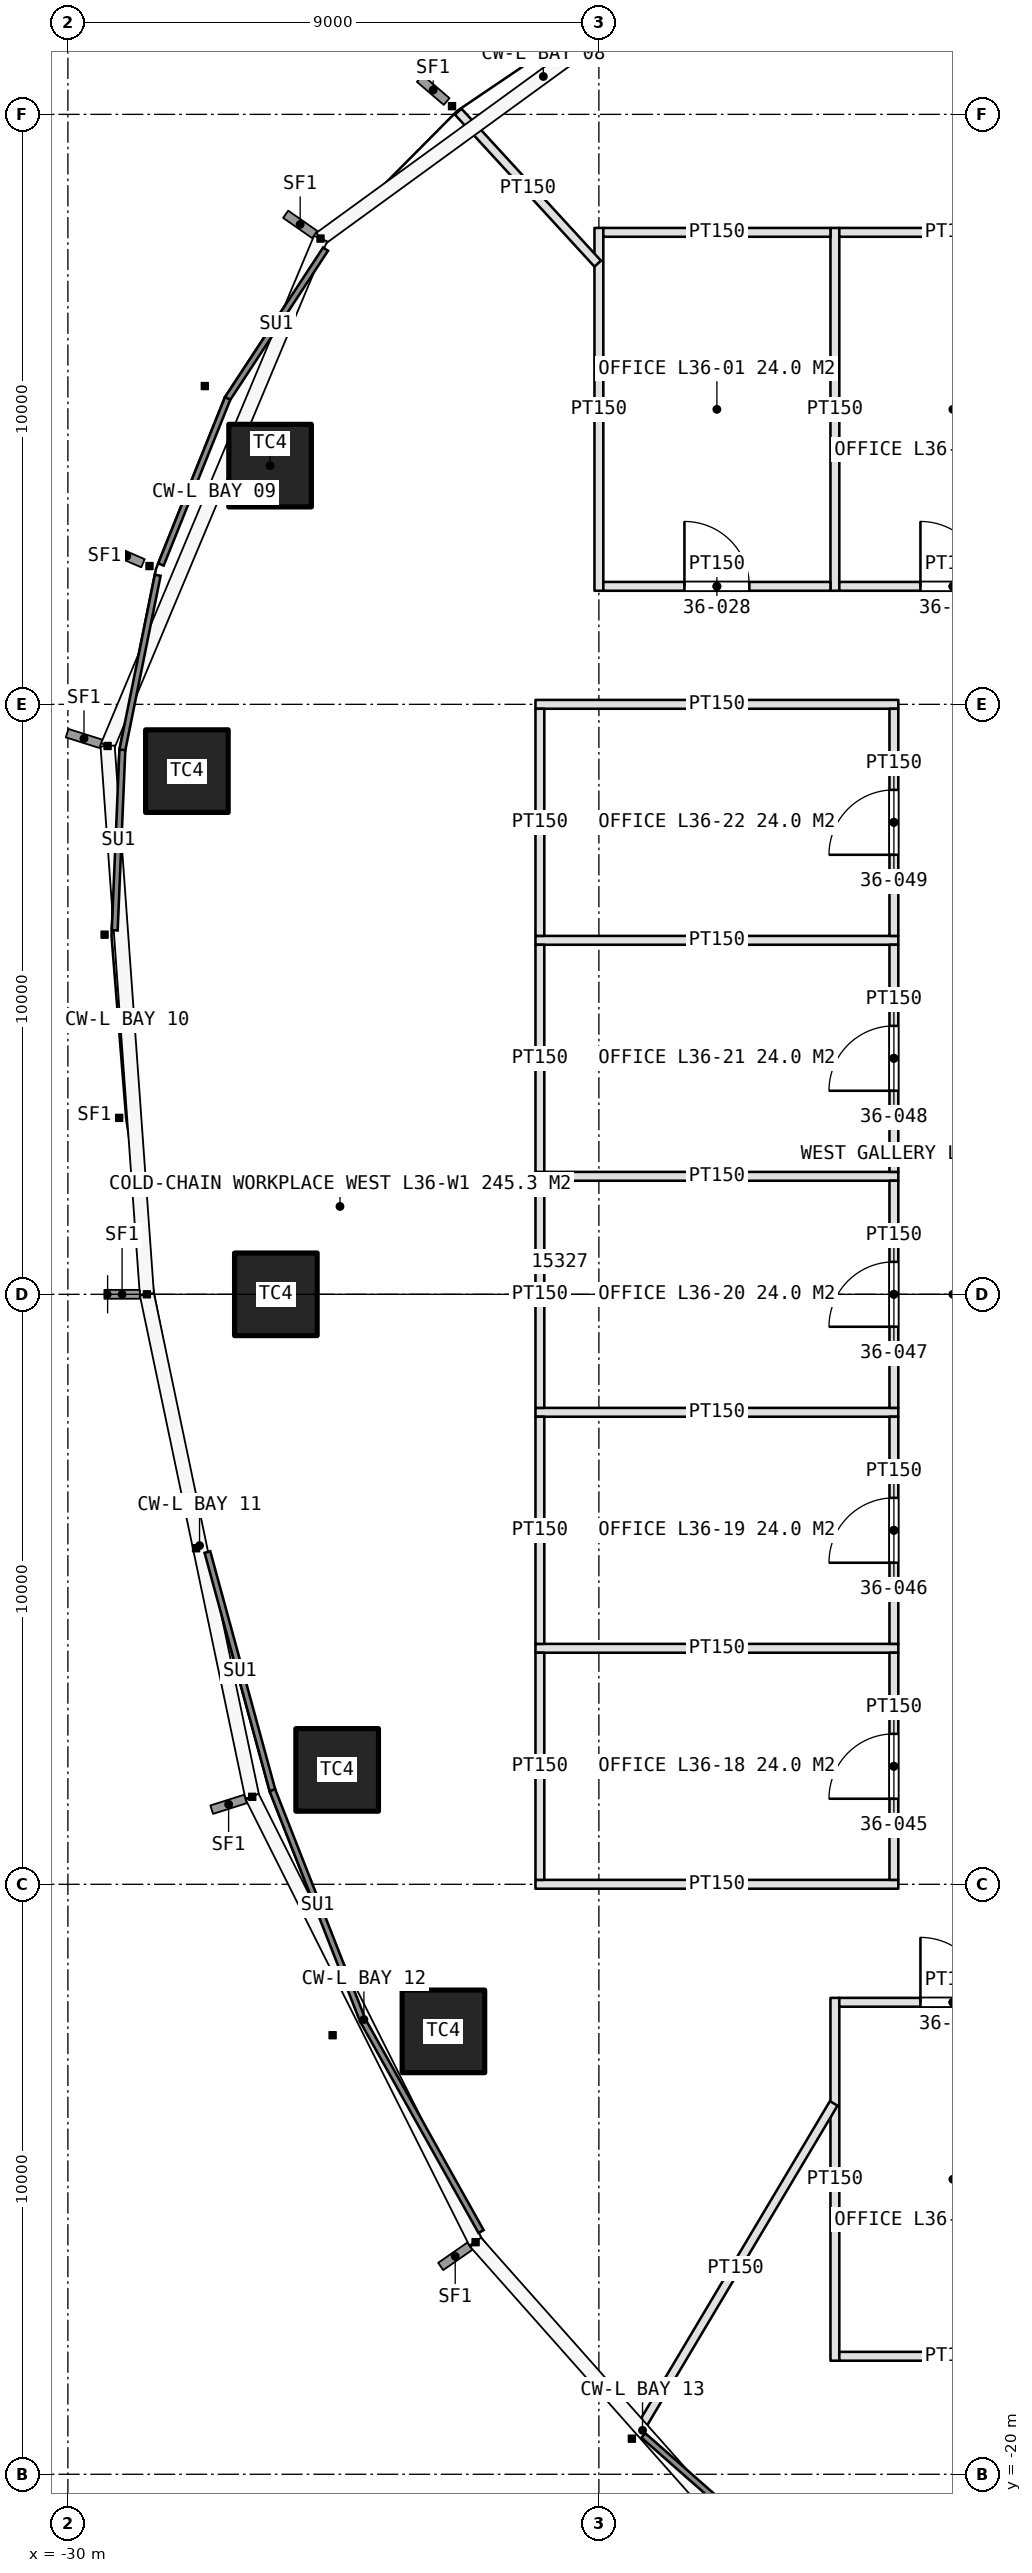
"""IFC4 building model, lengths in metres.
Left out: names, types, materials, properties, quantities, classifications, styles, units other than length and angle.
Written with IfcOpenShell. Run it as: python <this file> out.ifc"""

import sys

from ifc_helpers import new_model, si_unit, direction, frame, frame_2d, origin, origin_2d, place, context, subcontext, project, spatial, rectangle, extrude, element, fill, save


model = new_model("IFC4")
c1 = context("Model", 3, precision=1e-05, world=origin(), true_north=direction((0.0, 1.0)))
c2 = subcontext(c1, "Body", "Model", "MODEL_VIEW")
j1 = project(units=[si_unit("LENGTHUNIT", "METRE"), si_unit("PLANEANGLEUNIT", "RADIAN")], contexts=[c1])
p1 = place(None, origin())
s1 = spatial("IfcSite", under=j1, at=p1, CompositionType="ELEMENT")
p2 = place(p1, origin())
s2 = spatial("IfcBuilding", under=s1, at=p2, CompositionType="ELEMENT")
p3 = place(p2, frame((0.0, 0.0, 168.0)))
s3 = spatial("IfcBuildingStorey", under=s2, at=p3, CompositionType="ELEMENT", Elevation=168.0)
for number, where, z_axis, x_axis in (
    (1, (-26.573, 14.046, 0.0), (0.0, 0.0, 1.0), (1.0, 0.0, 0.0)),
    (2, (-27.983, 8.868, 0.0), (0.0, 0.0, 1.0), (1.0, 0.0, 0.0)),
    (3, (-26.475, 0.0, 0.0), (0.0, 0.0, 1.0), (1.0, 0.0, 0.0)),
    (4, (-25.436, -8.061, 0.0), (0.0, 0.0, 1.0), (1.0, 0.0, 0.0)),
    (5, (-23.635, -12.493, 0.0), (0.0, 0.0, 1.0), (1.0, 0.0, 0.0)),
):
    element("IfcColumn", number, at=place(p3, frame(where, z_axis=z_axis, x_axis=x_axis)), inside=s3, PredefinedType="COLUMN", context=c2, shape_type="SweptSolid", body=[
        extrude(rectangle(XDim=1.4, YDim=1.4, at=origin_2d()), origin(), (0.0, 0.0, 1.0), 4.2),
    ])
for number, where, z_axis, x_axis in (
    (6, (-21.0, 11.925, 0.0), (0.0, 0.0, 1.0), (0.0, 1.0, 0.0)),
    (7, (-17.0, 11.925, 0.0), (0.0, 0.0, 1.0), (0.0, 1.0, 0.0)),
):
    element("IfcWall", number, at=place(p3, frame(where, z_axis=z_axis, x_axis=x_axis)), inside=s3, PredefinedType="PARTITIONING", context=c2, shape_type="SweptSolid", body=[
        extrude(rectangle(XDim=6.15, YDim=0.15, at=frame_2d((3.075, 0.0))), origin(), (0.0, 0.0, 1.0), 3.0),
    ])
p4 = place(p3, frame((-20.925, 12.0, 0.0), z_axis=(0.0, 0.0, 1.0), x_axis=(1.0, 0.0, 0.0)))
e8 = element("IfcWall", 8, at=p4, inside=s3, PredefinedType="PARTITIONING", context=c2, shape_type="SweptSolid", body=[
    extrude(rectangle(XDim=3.85, YDim=0.15, at=frame_2d((1.925, 0.0))), origin(), (0.0, 0.0, 1.0), 3.0),
])
p5 = place(p4, frame((1.375, 0.0, 0.0)))
e9 = element("IfcOpeningElement", 9, at=p5, cuts=e8, PredefinedType="OPENING", context=c2, shape_type="SweptSolid", body=[
    extrude(rectangle(XDim=1.1, YDim=2.3, at=frame_2d((0.55, 1.15))), frame((0.0, 0.085, 0.0), z_axis=(0.0, -1.0, 0.0), x_axis=(1.0, 0.0, 0.0)), (0.0, 0.0, 1.0), 0.17),
])
p6 = place(p3, frame((-20.925, 18.0, 0.0), z_axis=(0.0, 0.0, 1.0), x_axis=(1.0, 0.0, 0.0)))
e10 = element("IfcWall", 10, at=p6, inside=s3, PredefinedType="PARTITIONING", context=c2, shape_type="SweptSolid", body=[
    extrude(rectangle(XDim=3.85, YDim=0.15, at=frame_2d((1.925, 0.0))), origin(), (0.0, 0.0, 1.0), 3.0),
])
p7 = place(p3, frame((-16.925, 12.0, 0.0), z_axis=(0.0, 0.0, 1.0), x_axis=(1.0, 0.0, 0.0)))
e11 = element("IfcWall", 11, at=p7, inside=s3, PredefinedType="PARTITIONING", context=c2, shape_type="SweptSolid", body=[
    extrude(rectangle(XDim=3.85, YDim=0.15, at=frame_2d((1.925, 0.0))), origin(), (0.0, 0.0, 1.0), 3.0),
])
p8 = place(p7, frame((1.375, 0.0, 0.0)))
e12 = element("IfcOpeningElement", 12, at=p8, cuts=e11, PredefinedType="OPENING", context=c2, shape_type="SweptSolid", body=[
    extrude(rectangle(XDim=1.1, YDim=2.3, at=frame_2d((0.55, 1.15))), frame((0.0, 0.085, 0.0), z_axis=(0.0, -1.0, 0.0), x_axis=(1.0, 0.0, 0.0)), (0.0, 0.0, 1.0), 0.17),
])
p9 = place(p3, frame((-16.925, 18.0, 0.0), z_axis=(0.0, 0.0, 1.0), x_axis=(1.0, 0.0, 0.0)))
e13 = element("IfcWall", 13, at=p9, inside=s3, PredefinedType="PARTITIONING", context=c2, shape_type="SweptSolid", body=[
    extrude(rectangle(XDim=3.85, YDim=0.15, at=frame_2d((1.925, 0.0))), origin(), (0.0, 0.0, 1.0), 3.0),
])
p10 = place(p3, frame((-17.0, -11.925, 0.0), z_axis=(0.0, 0.0, 1.0), x_axis=(0.0, -1.0, 0.0)))
e14 = element("IfcWall", 14, at=p10, inside=s3, PredefinedType="PARTITIONING", context=c2, shape_type="SweptSolid", body=[
    extrude(rectangle(XDim=6.15, YDim=0.15, at=frame_2d((3.075, 0.0))), origin(), (0.0, 0.0, 1.0), 3.0),
])
p11 = place(p3, frame((-16.925, -12.0, 0.0), z_axis=(0.0, 0.0, 1.0), x_axis=(1.0, 0.0, 0.0)))
e15 = element("IfcWall", 15, at=p11, inside=s3, PredefinedType="PARTITIONING", context=c2, shape_type="SweptSolid", body=[
    extrude(rectangle(XDim=3.85, YDim=0.15, at=frame_2d((1.925, 0.0))), origin(), (0.0, 0.0, 1.0), 3.0),
])
p12 = place(p11, frame((1.375, 0.0, 0.0)))
e16 = element("IfcOpeningElement", 16, at=p12, cuts=e15, PredefinedType="OPENING", context=c2, shape_type="SweptSolid", body=[
    extrude(rectangle(XDim=1.1, YDim=2.3, at=frame_2d((0.55, 1.15))), frame((0.0, 0.085, 0.0), z_axis=(0.0, -1.0, 0.0), x_axis=(1.0, 0.0, 0.0)), (0.0, 0.0, 1.0), 0.17),
])
p13 = place(p3, frame((-16.925, -18.0, 0.0), z_axis=(0.0, 0.0, 1.0), x_axis=(1.0, 0.0, 0.0)))
e17 = element("IfcWall", 17, at=p13, inside=s3, PredefinedType="PARTITIONING", context=c2, shape_type="SweptSolid", body=[
    extrude(rectangle(XDim=3.85, YDim=0.15, at=frame_2d((1.925, 0.0))), origin(), (0.0, 0.0, 1.0), 3.0),
])
for number, where, z_axis, x_axis in (
    (18, (-15.925, -10.0, 0.0), (0.0, 0.0, 1.0), (-1.0, 0.0, 0.0)),
    (19, (-15.925, -6.0, 0.0), (0.0, 0.0, 1.0), (-1.0, 0.0, 0.0)),
    (20, (-15.925, -2.0, 0.0), (0.0, 0.0, 1.0), (-1.0, 0.0, 0.0)),
    (21, (-15.925, 2.0, 0.0), (0.0, 0.0, 1.0), (-1.0, 0.0, 0.0)),
    (22, (-15.925, 6.0, 0.0), (0.0, 0.0, 1.0), (-1.0, 0.0, 0.0)),
    (23, (-15.925, 10.0, 0.0), (0.0, 0.0, 1.0), (-1.0, 0.0, 0.0)),
):
    element("IfcWall", number, at=place(p3, frame(where, z_axis=z_axis, x_axis=x_axis)), inside=s3, PredefinedType="PARTITIONING", context=c2, shape_type="SweptSolid", body=[
        extrude(rectangle(XDim=6.15, YDim=0.15, at=frame_2d((3.075, 0.0))), origin(), (0.0, 0.0, 1.0), 3.0),
    ])
p14 = place(p3, frame((-16.0, -9.925, 0.0), z_axis=(0.0, 0.0, 1.0), x_axis=(0.0, 1.0, 0.0)))
e24 = element("IfcWall", 24, at=p14, inside=s3, PredefinedType="PARTITIONING", context=c2, shape_type="SweptSolid", body=[
    extrude(rectangle(XDim=3.85, YDim=0.15, at=frame_2d((1.925, 0.0))), origin(), (0.0, 0.0, 1.0), 3.0),
])
p15 = place(p14, frame((1.375, 0.0, 0.0)))
e25 = element("IfcOpeningElement", 25, at=p15, cuts=e24, PredefinedType="OPENING", context=c2, shape_type="SweptSolid", body=[
    extrude(rectangle(XDim=1.1, YDim=2.3, at=frame_2d((0.55, 1.15))), frame((0.0, 0.085, 0.0), z_axis=(0.0, -1.0, 0.0), x_axis=(1.0, 0.0, 0.0)), (0.0, 0.0, 1.0), 0.17),
])
p16 = place(p3, frame((-22.0, -9.925, 0.0), z_axis=(0.0, 0.0, 1.0), x_axis=(0.0, 1.0, 0.0)))
e26 = element("IfcWall", 26, at=p16, inside=s3, PredefinedType="PARTITIONING", context=c2, shape_type="SweptSolid", body=[
    extrude(rectangle(XDim=3.85, YDim=0.15, at=frame_2d((1.925, 0.0))), origin(), (0.0, 0.0, 1.0), 3.0),
])
p17 = place(p3, frame((-16.0, -5.925, 0.0), z_axis=(0.0, 0.0, 1.0), x_axis=(0.0, 1.0, 0.0)))
e27 = element("IfcWall", 27, at=p17, inside=s3, PredefinedType="PARTITIONING", context=c2, shape_type="SweptSolid", body=[
    extrude(rectangle(XDim=3.85, YDim=0.15, at=frame_2d((1.925, 0.0))), origin(), (0.0, 0.0, 1.0), 3.0),
])
p18 = place(p17, frame((1.375, 0.0, 0.0)))
e28 = element("IfcOpeningElement", 28, at=p18, cuts=e27, PredefinedType="OPENING", context=c2, shape_type="SweptSolid", body=[
    extrude(rectangle(XDim=1.1, YDim=2.3, at=frame_2d((0.55, 1.15))), frame((0.0, 0.085, 0.0), z_axis=(0.0, -1.0, 0.0), x_axis=(1.0, 0.0, 0.0)), (0.0, 0.0, 1.0), 0.17),
])
p19 = place(p3, frame((-22.0, -5.925, 0.0), z_axis=(0.0, 0.0, 1.0), x_axis=(0.0, 1.0, 0.0)))
e29 = element("IfcWall", 29, at=p19, inside=s3, PredefinedType="PARTITIONING", context=c2, shape_type="SweptSolid", body=[
    extrude(rectangle(XDim=3.85, YDim=0.15, at=frame_2d((1.925, 0.0))), origin(), (0.0, 0.0, 1.0), 3.0),
])
p20 = place(p3, frame((-16.0, -1.925, 0.0), z_axis=(0.0, 0.0, 1.0), x_axis=(0.0, 1.0, 0.0)))
e30 = element("IfcWall", 30, at=p20, inside=s3, PredefinedType="PARTITIONING", context=c2, shape_type="SweptSolid", body=[
    extrude(rectangle(XDim=3.85, YDim=0.15, at=frame_2d((1.925, 0.0))), origin(), (0.0, 0.0, 1.0), 3.0),
])
p21 = place(p20, frame((1.375, 0.0, 0.0)))
e31 = element("IfcOpeningElement", 31, at=p21, cuts=e30, PredefinedType="OPENING", context=c2, shape_type="SweptSolid", body=[
    extrude(rectangle(XDim=1.1, YDim=2.3, at=frame_2d((0.55, 1.15))), frame((0.0, 0.085, 0.0), z_axis=(0.0, -1.0, 0.0), x_axis=(1.0, 0.0, 0.0)), (0.0, 0.0, 1.0), 0.17),
])
p22 = place(p3, frame((-22.0, -1.925, 0.0), z_axis=(0.0, 0.0, 1.0), x_axis=(0.0, 1.0, 0.0)))
e32 = element("IfcWall", 32, at=p22, inside=s3, PredefinedType="PARTITIONING", context=c2, shape_type="SweptSolid", body=[
    extrude(rectangle(XDim=3.85, YDim=0.15, at=frame_2d((1.925, 0.0))), origin(), (0.0, 0.0, 1.0), 3.0),
])
p23 = place(p3, frame((-16.0, 2.075, 0.0), z_axis=(0.0, 0.0, 1.0), x_axis=(0.0, 1.0, 0.0)))
e33 = element("IfcWall", 33, at=p23, inside=s3, PredefinedType="PARTITIONING", context=c2, shape_type="SweptSolid", body=[
    extrude(rectangle(XDim=3.85, YDim=0.15, at=frame_2d((1.925, 0.0))), origin(), (0.0, 0.0, 1.0), 3.0),
])
p24 = place(p23, frame((1.375, 0.0, 0.0)))
e34 = element("IfcOpeningElement", 34, at=p24, cuts=e33, PredefinedType="OPENING", context=c2, shape_type="SweptSolid", body=[
    extrude(rectangle(XDim=1.1, YDim=2.3, at=frame_2d((0.55, 1.15))), frame((0.0, 0.085, 0.0), z_axis=(0.0, -1.0, 0.0), x_axis=(1.0, 0.0, 0.0)), (0.0, 0.0, 1.0), 0.17),
])
p25 = place(p3, frame((-22.0, 2.075, 0.0), z_axis=(0.0, 0.0, 1.0), x_axis=(0.0, 1.0, 0.0)))
e35 = element("IfcWall", 35, at=p25, inside=s3, PredefinedType="PARTITIONING", context=c2, shape_type="SweptSolid", body=[
    extrude(rectangle(XDim=3.85, YDim=0.15, at=frame_2d((1.925, 0.0))), origin(), (0.0, 0.0, 1.0), 3.0),
])
p26 = place(p3, frame((-16.0, 6.075, 0.0), z_axis=(0.0, 0.0, 1.0), x_axis=(0.0, 1.0, 0.0)))
e36 = element("IfcWall", 36, at=p26, inside=s3, PredefinedType="PARTITIONING", context=c2, shape_type="SweptSolid", body=[
    extrude(rectangle(XDim=3.85, YDim=0.15, at=frame_2d((1.925, 0.0))), origin(), (0.0, 0.0, 1.0), 3.0),
])
p27 = place(p26, frame((1.375, 0.0, 0.0)))
e37 = element("IfcOpeningElement", 37, at=p27, cuts=e36, PredefinedType="OPENING", context=c2, shape_type="SweptSolid", body=[
    extrude(rectangle(XDim=1.1, YDim=2.3, at=frame_2d((0.55, 1.15))), frame((0.0, 0.085, 0.0), z_axis=(0.0, -1.0, 0.0), x_axis=(1.0, 0.0, 0.0)), (0.0, 0.0, 1.0), 0.17),
])
p28 = place(p3, frame((-22.0, 6.075, 0.0), z_axis=(0.0, 0.0, 1.0), x_axis=(0.0, 1.0, 0.0)))
e38 = element("IfcWall", 38, at=p28, inside=s3, PredefinedType="PARTITIONING", context=c2, shape_type="SweptSolid", body=[
    extrude(rectangle(XDim=3.85, YDim=0.15, at=frame_2d((1.925, 0.0))), origin(), (0.0, 0.0, 1.0), 3.0),
])
p29 = place(p3, frame((-17.02, -13.713, 0.0), z_axis=(0.0, 0.0, 1.0), x_axis=(-0.511508304982, -0.859278333216, 0.0)))
e39 = element("IfcWall", 39, at=p29, inside=s3, PredefinedType="PARTITIONING", context=c2, shape_type="SweptSolid", body=[
    extrude(rectangle(XDim=6.497, YDim=0.15, at=frame_2d((3.248, 0.0))), origin(), (0.0, 0.0, 1.0), 3.0),
])
p30 = place(p3, frame((-21.02, 17.47, 0.0), z_axis=(0.0, 0.0, 1.0), x_axis=(-0.67615762792, 0.736756989927, 0.0)))
e40 = element("IfcWall", 40, at=p30, inside=s3, PredefinedType="PARTITIONING", context=c2, shape_type="SweptSolid", body=[
    extrude(rectangle(XDim=3.497, YDim=0.15, at=frame_2d((1.749, 0.0))), origin(), (0.0, 0.0, 1.0), 3.0),
])
p31 = place(p5, origin())
e41 = element("IfcDoor", 41, at=p31, inside=s3, OperationType="SINGLE_SWING_LEFT", PredefinedType="DOOR", context=c2, shape_type="SweptSolid", body=[
    extrude(rectangle(XDim=1.1, YDim=2.3, at=frame_2d((0.55, 1.15))), frame((0.0, 0.025, 0.0), z_axis=(0.0, -1.0, 0.0), x_axis=(1.0, 0.0, 0.0)), (0.0, 0.0, 1.0), 0.05),
])
fill(e9, e41)
p32 = place(p8, origin())
e42 = element("IfcDoor", 42, at=p32, inside=s3, OperationType="SINGLE_SWING_LEFT", PredefinedType="DOOR", context=c2, shape_type="SweptSolid", body=[
    extrude(rectangle(XDim=1.1, YDim=2.3, at=frame_2d((0.55, 1.15))), frame((0.0, 0.025, 0.0), z_axis=(0.0, -1.0, 0.0), x_axis=(1.0, 0.0, 0.0)), (0.0, 0.0, 1.0), 0.05),
])
fill(e12, e42)
p33 = place(p12, origin())
e43 = element("IfcDoor", 43, at=p33, inside=s3, OperationType="SINGLE_SWING_LEFT", PredefinedType="DOOR", context=c2, shape_type="SweptSolid", body=[
    extrude(rectangle(XDim=1.1, YDim=2.3, at=frame_2d((0.55, 1.15))), frame((0.0, 0.025, 0.0), z_axis=(0.0, -1.0, 0.0), x_axis=(1.0, 0.0, 0.0)), (0.0, 0.0, 1.0), 0.05),
])
fill(e16, e43)
p34 = place(p15, origin())
e44 = element("IfcDoor", 44, at=p34, inside=s3, OperationType="SINGLE_SWING_LEFT", PredefinedType="DOOR", context=c2, shape_type="SweptSolid", body=[
    extrude(rectangle(XDim=1.1, YDim=2.3, at=frame_2d((0.55, 1.15))), frame((0.0, 0.025, 0.0), z_axis=(0.0, -1.0, 0.0), x_axis=(1.0, 0.0, 0.0)), (0.0, 0.0, 1.0), 0.05),
])
fill(e25, e44)
p35 = place(p18, origin())
e45 = element("IfcDoor", 45, at=p35, inside=s3, OperationType="SINGLE_SWING_LEFT", PredefinedType="DOOR", context=c2, shape_type="SweptSolid", body=[
    extrude(rectangle(XDim=1.1, YDim=2.3, at=frame_2d((0.55, 1.15))), frame((0.0, 0.025, 0.0), z_axis=(0.0, -1.0, 0.0), x_axis=(1.0, 0.0, 0.0)), (0.0, 0.0, 1.0), 0.05),
])
fill(e28, e45)
p36 = place(p21, origin())
e46 = element("IfcDoor", 46, at=p36, inside=s3, OperationType="SINGLE_SWING_LEFT", PredefinedType="DOOR", context=c2, shape_type="SweptSolid", body=[
    extrude(rectangle(XDim=1.1, YDim=2.3, at=frame_2d((0.55, 1.15))), frame((0.0, 0.025, 0.0), z_axis=(0.0, -1.0, 0.0), x_axis=(1.0, 0.0, 0.0)), (0.0, 0.0, 1.0), 0.05),
])
fill(e31, e46)
p37 = place(p24, origin())
e47 = element("IfcDoor", 47, at=p37, inside=s3, OperationType="SINGLE_SWING_LEFT", PredefinedType="DOOR", context=c2, shape_type="SweptSolid", body=[
    extrude(rectangle(XDim=1.1, YDim=2.3, at=frame_2d((0.55, 1.15))), frame((0.0, 0.025, 0.0), z_axis=(0.0, -1.0, 0.0), x_axis=(1.0, 0.0, 0.0)), (0.0, 0.0, 1.0), 0.05),
])
fill(e34, e47)
p38 = place(p27, origin())
e48 = element("IfcDoor", 48, at=p38, inside=s3, OperationType="SINGLE_SWING_LEFT", PredefinedType="DOOR", context=c2, shape_type="SweptSolid", body=[
    extrude(rectangle(XDim=1.1, YDim=2.3, at=frame_2d((0.55, 1.15))), frame((0.0, 0.025, 0.0), z_axis=(0.0, -1.0, 0.0), x_axis=(1.0, 0.0, 0.0)), (0.0, 0.0, 1.0), 0.05),
])
fill(e37, e48)
save(model, sys.argv[1])
